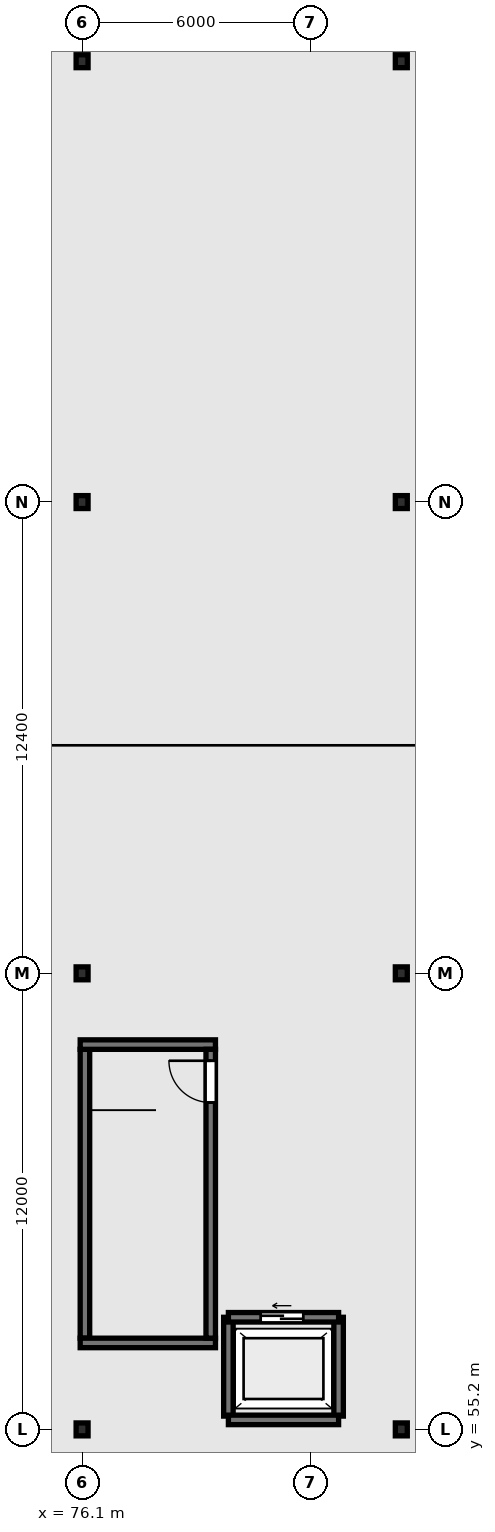
"""IFC4 building model, lengths in metres.
Left out: names, types, materials, properties, quantities, classifications, styles, units other than length and angle.
Written with IfcOpenShell. Run it as: python <this file> out.ifc"""

import sys

from ifc_helpers import new_model, si_unit, direction, frame, frame_2d, origin, origin_2d, place, context, subcontext, project, spatial, rectangle, i_section, extrude, element, fill, save


model = new_model("IFC4")
c1 = context("Model", 3, precision=1e-05, world=origin(), true_north=direction((0.0, 1.0)))
c2 = subcontext(c1, "Body", "Model", "MODEL_VIEW")
j1 = project(units=[si_unit("LENGTHUNIT", "METRE"), si_unit("PLANEANGLEUNIT", "RADIAN")], contexts=[c1])
p1 = place(None, origin())
s1 = spatial("IfcSite", under=j1, at=p1, CompositionType="ELEMENT")
p2 = place(p1, origin())
s2 = spatial("IfcBuilding", under=s1, at=p2, CompositionType="ELEMENT")
p3 = place(p2, frame((0.0, 0.0, 264.2)))
s3 = spatial("IfcBuildingStorey", under=s2, at=p3, CompositionType="ELEMENT", Elevation=264.2)
for number, where, z_axis, x_axis in (
    (1, (76.1, 55.2, 0.0), (0.0, 0.0, 1.0), (1.0, 0.0, 0.0)),
    (2, (76.1, 67.2, 0.0), (0.0, 0.0, 1.0), (1.0, 0.0, 0.0)),
    (3, (76.1, 79.6, 0.0), (0.0, 0.0, 1.0), (1.0, 0.0, 0.0)),
    (4, (76.1, 91.2, 0.0), (0.0, 0.0, 1.0), (1.0, 0.0, 0.0)),
):
    element("IfcColumn", number, at=place(p3, frame(where, z_axis=z_axis, x_axis=x_axis)), inside=s3, PredefinedType="COLUMN", context=c2, shape_type="SweptSolid", body=[
        extrude(i_section(OverallWidth=0.314, OverallDepth=0.34, WebThickness=0.019, FlangeThickness=0.031, FilletRadius=0.015, at=origin_2d()), origin(), (0.0, 0.0, 1.0), 12.411),
    ])
for number, where, z_axis, x_axis in (
    (5, (84.5, 55.2, 0.0), (0.0, 0.0, 1.0), (1.0, 0.0, 0.0)),
    (6, (84.5, 67.2, 0.0), (0.0, 0.0, 1.0), (1.0, 0.0, 0.0)),
    (7, (84.5, 79.6, 0.0), (0.0, 0.0, 1.0), (1.0, 0.0, 0.0)),
    (8, (84.5, 91.2, 0.0), (0.0, 0.0, 1.0), (1.0, 0.0, 0.0)),
):
    element("IfcColumn", number, at=place(p3, frame(where, z_axis=z_axis, x_axis=x_axis)), inside=s3, PredefinedType="COLUMN", context=c2, shape_type="SweptSolid", body=[
        extrude(i_section(OverallWidth=0.314, OverallDepth=0.34, WebThickness=0.019, FlangeThickness=0.031, FilletRadius=0.015, at=origin_2d()), origin(), (0.0, 0.0, 1.0), 12.099),
    ])
p4 = place(p3, frame((76.175, 57.6, 0.0), z_axis=(0.0, 0.0, 1.0), x_axis=(0.0, 1.0, 0.0)))
e9 = element("IfcWall", 9, at=p4, inside=s3, PredefinedType="SHEAR", context=c2, shape_type="SweptSolid", body=[
    extrude(rectangle(XDim=7.6, YDim=0.25, at=frame_2d((3.8, 0.0))), origin(), (0.0, 0.0, 1.0), 11.95),
])
for number, where, z_axis, x_axis in (
    (10, (76.05, 57.475, 0.0), (0.0, 0.0, 1.0), (1.0, 0.0, 0.0)),
    (11, (76.05, 65.325, 0.0), (0.0, 0.0, 1.0), (1.0, 0.0, 0.0)),
):
    element("IfcWall", number, at=place(p3, frame(where, z_axis=z_axis, x_axis=x_axis)), inside=s3, PredefinedType="SHEAR", context=c2, shape_type="SweptSolid", body=[
        extrude(rectangle(XDim=3.56, YDim=0.25, at=frame_2d((1.78, 0.0))), origin(), (0.0, 0.0, 1.0), 11.95),
    ])
p5 = place(p3, frame((79.485, 57.6, 0.0), z_axis=(0.0, 0.0, 1.0), x_axis=(0.0, 1.0, 0.0)))
e12 = element("IfcWall", 12, at=p5, inside=s3, PredefinedType="SHEAR", context=c2, shape_type="SweptSolid", body=[
    extrude(rectangle(XDim=7.6, YDim=0.25, at=frame_2d((3.8, 0.0))), origin(), (0.0, 0.0, 1.0), 11.95),
])
p6 = place(p5, frame((6.2, 0.0, 0.0)))
e13 = element("IfcOpeningElement", 13, at=p6, cuts=e12, PredefinedType="OPENING", context=c2, shape_type="SweptSolid", body=[
    extrude(rectangle(XDim=1.1, YDim=2.1, at=frame_2d((0.55, 1.05))), frame((0.0, 0.135, 0.0), z_axis=(0.0, -1.0, 0.0), x_axis=(1.0, 0.0, 0.0)), (0.0, 0.0, 1.0), 0.27),
])
for number, where, z_axis, x_axis in (
    (14, (79.95, 55.55, 0.0), (0.0, 0.0, 1.0), (0.0, 1.0, 0.0)),
    (15, (82.85, 55.55, 0.0), (0.0, 0.0, 1.0), (0.0, 1.0, 0.0)),
):
    element("IfcWall", number, at=place(p3, frame(where, z_axis=z_axis, x_axis=x_axis)), inside=s3, PredefinedType="SHEAR", context=c2, shape_type="SweptSolid", body=[
        extrude(rectangle(XDim=2.6, YDim=0.25, at=frame_2d((1.3, 0.0))), origin(), (0.0, 0.0, 1.0), 11.95),
    ])
p7 = place(p3, frame((79.95, 55.45, 0.0), z_axis=(0.0, 0.0, 1.0), x_axis=(1.0, 0.0, 0.0)))
e16 = element("IfcWall", 16, at=p7, inside=s3, PredefinedType="SHEAR", context=c2, shape_type="SweptSolid", body=[
    extrude(rectangle(XDim=2.9, YDim=0.25, at=frame_2d((1.45, 0.0))), origin(), (0.0, 0.0, 1.0), 11.95),
])
p8 = place(p3, frame((79.95, 58.15, 0.0), z_axis=(0.0, 0.0, 1.0), x_axis=(1.0, 0.0, 0.0)))
e17 = element("IfcWall", 17, at=p8, inside=s3, PredefinedType="SHEAR", context=c2, shape_type="SweptSolid", body=[
    extrude(rectangle(XDim=2.9, YDim=0.25, at=frame_2d((1.45, 0.0))), origin(), (0.0, 0.0, 1.0), 11.95),
])
p9 = place(p8, frame((0.85, 0.0, 0.0)))
e18 = element("IfcOpeningElement", 18, at=p9, cuts=e17, PredefinedType="OPENING", context=c2, shape_type="SweptSolid", body=[
    extrude(rectangle(XDim=1.12, YDim=2.12, at=frame_2d((0.56, 1.06))), frame((0.0, 0.135, 0.0), z_axis=(0.0, -1.0, 0.0), x_axis=(1.0, 0.0, 0.0)), (0.0, 0.0, 1.0), 0.27),
])
p10 = place(p6, origin())
e19 = element("IfcDoor", 19, at=p10, inside=s3, OperationType="SINGLE_SWING_RIGHT", PredefinedType="DOOR", context=c2, shape_type="SweptSolid", body=[
    extrude(rectangle(XDim=1.1, YDim=2.1, at=frame_2d((0.55, 1.05))), frame((0.0, 0.025, 0.0), z_axis=(0.0, -1.0, 0.0), x_axis=(1.0, 0.0, 0.0)), (0.0, 0.0, 1.0), 0.05),
])
fill(e13, e19)
p11 = place(p9, origin())
e20 = element("IfcDoor", 20, at=p11, inside=s3, OperationType="SLIDING_TO_LEFT", PredefinedType="DOOR", context=c2, shape_type="SweptSolid", body=[
    extrude(rectangle(XDim=1.12, YDim=2.12, at=frame_2d((0.56, 1.06))), frame((0.0, 0.025, 0.0), z_axis=(0.0, -1.0, 0.0), x_axis=(1.0, 0.0, 0.0)), (0.0, 0.0, 1.0), 0.05),
])
fill(e18, e20)
save(model, sys.argv[1])
